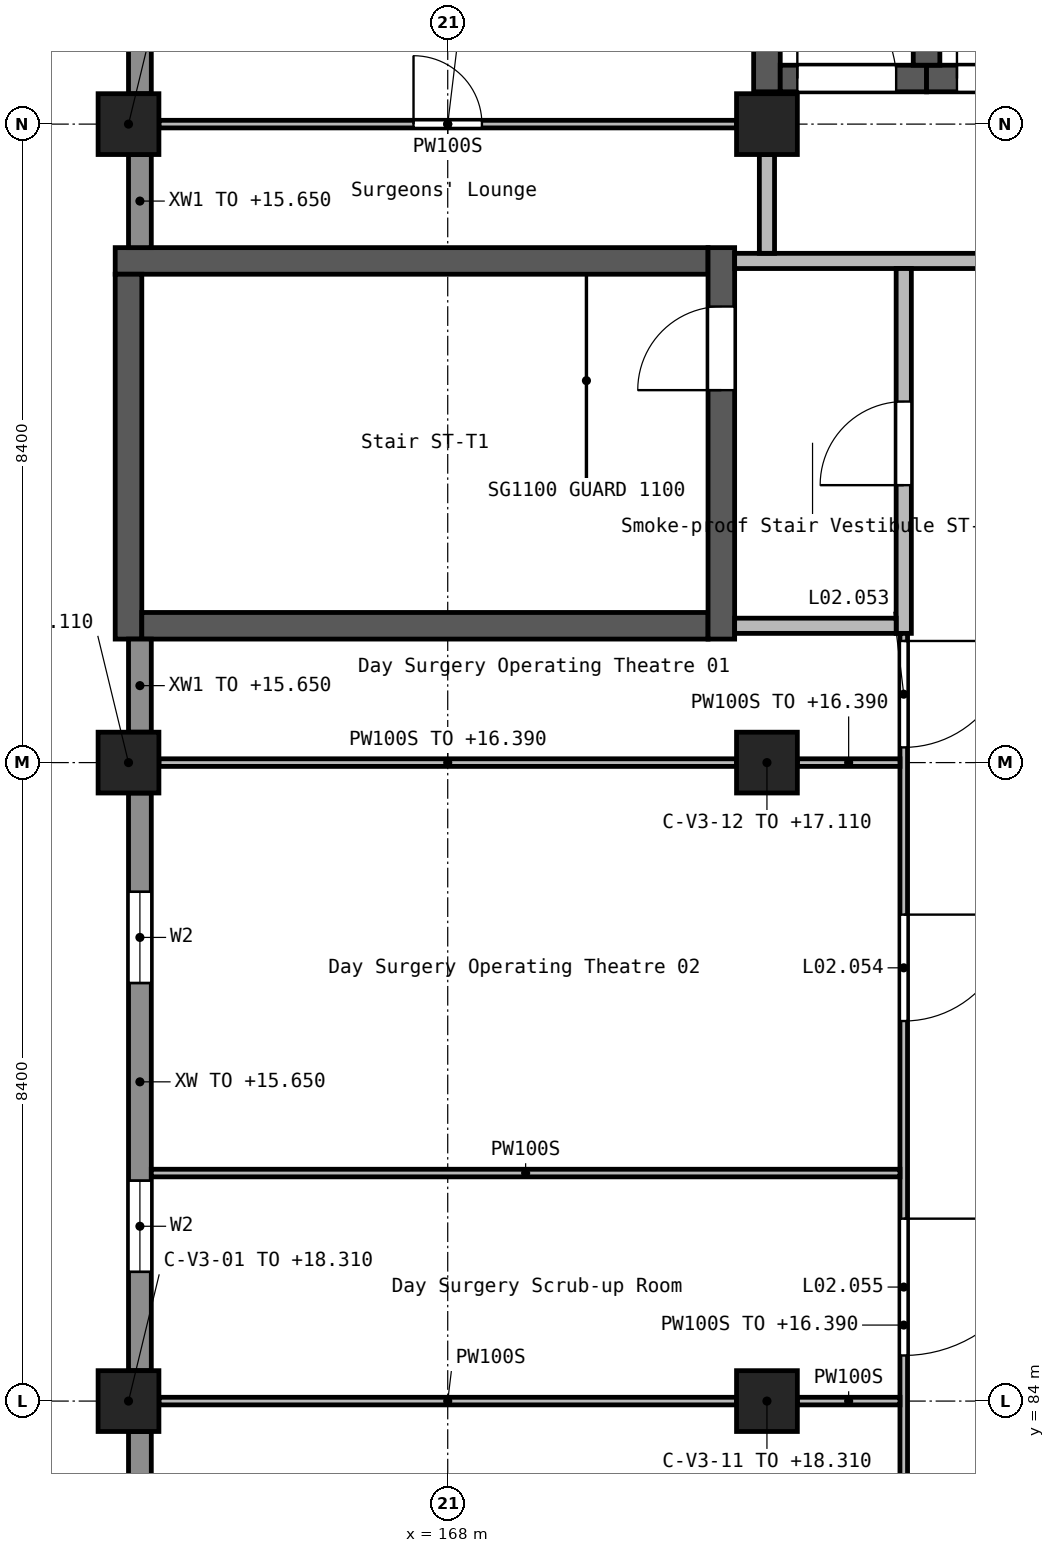
"""IFC4 building model, lengths in metres.
Left out: names, types, materials, properties, quantities, classifications, styles, units other than length and angle.
Written with IfcOpenShell. Run it as: python <this file> out.ifc"""

import sys

from ifc_helpers import new_model, si_unit, direction, frame, frame_2d, origin, origin_2d, place, context, subcontext, project, spatial, rectangle, extrude, element, fill, save


model = new_model("IFC4")
c1 = context("Model", 3, precision=1e-05, world=origin(), true_north=direction((0.0, 1.0)))
c2 = subcontext(c1, "Body", "Model", "MODEL_VIEW")
j1 = project(units=[si_unit("LENGTHUNIT", "METRE"), si_unit("PLANEANGLEUNIT", "RADIAN")], contexts=[c1])
p1 = place(None, origin())
s1 = spatial("IfcSite", under=j1, at=p1, CompositionType="ELEMENT")
p2 = place(p1, origin())
s2 = spatial("IfcBuilding", under=s1, at=p2, CompositionType="ELEMENT")
p3 = place(p2, frame((0.0, 0.0, 12.6)))
s3 = spatial("IfcBuildingStorey", under=s2, at=p3, CompositionType="ELEMENT", Elevation=12.6)
p4 = place(p3, frame((163.8, 84.0, 0.0), z_axis=(0.0, 0.0, 1.0), x_axis=(1.0, 0.0, 0.0)))
e1 = element("IfcColumn", 1, at=p4, inside=s3, PredefinedType="COLUMN", context=c2, shape_type="SweptSolid", body=[
    extrude(rectangle(XDim=0.8, YDim=0.8, at=origin_2d()), origin(), (0.0, 0.0, 1.0), 5.71),
])
p5 = place(p3, frame((163.8, 92.4, 0.0), z_axis=(0.0, 0.0, 1.0), x_axis=(1.0, 0.0, 0.0)))
e2 = element("IfcColumn", 2, at=p5, inside=s3, PredefinedType="COLUMN", context=c2, shape_type="SweptSolid", body=[
    extrude(rectangle(XDim=0.8, YDim=0.8, at=origin_2d()), origin(), (0.0, 0.0, 1.0), 4.51),
])
p6 = place(p3, frame((163.8, 100.8, 0.0), z_axis=(0.0, 0.0, 1.0), x_axis=(1.0, 0.0, 0.0)))
e3 = element("IfcColumn", 3, at=p6, inside=s3, PredefinedType="COLUMN", context=c2, shape_type="SweptSolid", body=[
    extrude(rectangle(XDim=0.8, YDim=0.8, at=origin_2d()), origin(), (0.0, 0.0, 1.0), 6.31),
])
p7 = place(p3, frame((172.2, 84.0, 0.0), z_axis=(0.0, 0.0, 1.0), x_axis=(1.0, 0.0, 0.0)))
e4 = element("IfcColumn", 4, at=p7, inside=s3, PredefinedType="COLUMN", context=c2, shape_type="SweptSolid", body=[
    extrude(rectangle(XDim=0.8, YDim=0.8, at=origin_2d()), origin(), (0.0, 0.0, 1.0), 5.71),
])
p8 = place(p3, frame((172.2, 92.4, 0.0), z_axis=(0.0, 0.0, 1.0), x_axis=(1.0, 0.0, 0.0)))
e5 = element("IfcColumn", 5, at=p8, inside=s3, PredefinedType="COLUMN", context=c2, shape_type="SweptSolid", body=[
    extrude(rectangle(XDim=0.8, YDim=0.8, at=origin_2d()), origin(), (0.0, 0.0, 1.0), 4.51),
])
p9 = place(p3, frame((172.2, 100.8, 0.0), z_axis=(0.0, 0.0, 1.0), x_axis=(1.0, 0.0, 0.0)))
e6 = element("IfcColumn", 6, at=p9, inside=s3, PredefinedType="COLUMN", context=c2, shape_type="SweptSolid", body=[
    extrude(rectangle(XDim=0.8, YDim=0.8, at=origin_2d()), origin(), (0.0, 0.0, 1.0), 6.31),
])
p10 = place(p3, frame((163.625, 99.0, 0.0), z_axis=(0.0, 0.0, 1.0), x_axis=(1.0, 0.0, 0.0)))
e7 = element("IfcWall", 7, at=p10, inside=s3, PredefinedType="SHEAR", context=c2, shape_type="SweptSolid", body=[
    extrude(rectangle(XDim=7.8, YDim=0.35, at=frame_2d((3.9, 0.0))), origin(), (0.0, 0.0, 1.0), 4.2),
])
p11 = place(p3, frame((163.8, 94.025, 0.0), z_axis=(0.0, 0.0, 1.0), x_axis=(0.0, 1.0, 0.0)))
e8 = element("IfcWall", 8, at=p11, inside=s3, PredefinedType="SHEAR", context=c2, shape_type="SweptSolid", body=[
    extrude(rectangle(XDim=4.8, YDim=0.35, at=frame_2d((2.4, 0.0))), origin(), (0.0, 0.0, 1.0), 4.2),
])
p12 = place(p3, frame((163.975, 94.2, 0.0), z_axis=(0.0, 0.0, 1.0), x_axis=(1.0, 0.0, 0.0)))
e9 = element("IfcWall", 9, at=p12, inside=s3, PredefinedType="SHEAR", context=c2, shape_type="SweptSolid", body=[
    extrude(rectangle(XDim=7.45, YDim=0.35, at=frame_2d((3.725, 0.0))), origin(), (0.0, 0.0, 1.0), 4.2),
])
p13 = place(p3, frame((171.6, 94.025, 0.0), z_axis=(0.0, 0.0, 1.0), x_axis=(0.0, 1.0, 0.0)))
e10 = element("IfcWall", 10, at=p13, inside=s3, PredefinedType="SHEAR", context=c2, shape_type="SweptSolid", body=[
    extrude(rectangle(XDim=5.15, YDim=0.35, at=frame_2d((2.575, 0.0))), origin(), (0.0, 0.0, 1.0), 4.2),
])
p14 = place(p13, frame((3.275, 0.0, 0.0)))
e11 = element("IfcOpeningElement", 11, at=p14, cuts=e10, PredefinedType="OPENING", context=c2, shape_type="SweptSolid", body=[
    extrude(rectangle(XDim=1.1, YDim=2.1, at=frame_2d((0.55, 1.05))), frame((0.0, 0.185, 0.0), z_axis=(0.0, -1.0, 0.0), x_axis=(1.0, 0.0, 0.0)), (0.0, 0.0, 1.0), 0.37),
])
p15 = place(p3, frame((172.2, 101.225, 0.0), z_axis=(0.0, 0.0, 1.0), x_axis=(0.0, 1.0, 0.0)))
e12 = element("IfcWall", 12, at=p15, inside=s3, PredefinedType="SHEAR", context=c2, shape_type="SweptSolid", body=[
    extrude(rectangle(XDim=5.4, YDim=0.35, at=frame_2d((2.7, 0.0))), origin(), (0.0, 0.0, 1.0), 4.2),
])
p16 = place(p3, frame((172.375, 101.4, 0.0), z_axis=(0.0, 0.0, 1.0), x_axis=(1.0, 0.0, 0.0)))
e13 = element("IfcWall", 13, at=p16, inside=s3, PredefinedType="SHEAR", context=c2, shape_type="SweptSolid", body=[
    extrude(rectangle(XDim=1.925, YDim=0.35, at=frame_2d((0.962, 0.0))), origin(), (0.0, 0.0, 1.0), 4.2),
])
p17 = place(p16, frame((0.225, 0.0, 0.0)))
e14 = element("IfcOpeningElement", 14, at=p17, cuts=e13, PredefinedType="OPENING", context=c2, shape_type="SweptSolid", body=[
    extrude(rectangle(XDim=1.3, YDim=2.1, at=frame_2d((0.65, 1.05))), frame((0.0, 0.185, 0.0), z_axis=(0.0, -1.0, 0.0), x_axis=(1.0, 0.0, 0.0)), (0.0, 0.0, 1.0), 0.37),
])
p18 = place(p3, frame((174.3, 101.4, 0.0), z_axis=(0.0, 0.0, 1.0), x_axis=(1.0, 0.0, 0.0)))
e15 = element("IfcWall", 15, at=p18, inside=s3, PredefinedType="SHEAR", context=c2, shape_type="SweptSolid", body=[
    extrude(rectangle(XDim=2.1, YDim=0.35, at=frame_2d((1.05, 0.0))), origin(), (0.0, 0.0, 1.0), 4.2),
])
p19 = place(p18, frame((0.4, 0.0, 0.0)))
e16 = element("IfcOpeningElement", 16, at=p19, cuts=e15, PredefinedType="OPENING", context=c2, shape_type="SweptSolid", body=[
    extrude(rectangle(XDim=1.3, YDim=2.1, at=frame_2d((0.65, 1.05))), frame((0.0, 0.185, 0.0), z_axis=(0.0, -1.0, 0.0), x_axis=(1.0, 0.0, 0.0)), (0.0, 0.0, 1.0), 0.37),
])
p20 = place(p3, frame((174.3, 101.575, 0.0), z_axis=(0.0, 0.0, 1.0), x_axis=(0.0, 1.0, 0.0)))
e17 = element("IfcWall", 17, at=p20, inside=s3, PredefinedType="SHEAR", context=c2, shape_type="SweptSolid", body=[
    extrude(rectangle(XDim=5.05, YDim=0.35, at=frame_2d((2.525, 0.0))), origin(), (0.0, 0.0, 1.0), 4.2),
])
p21 = place(p3, frame((163.95, 108.8, 0.0), z_axis=(0.0, 0.0, 1.0), x_axis=(0.0, -1.0, 0.0)))
e18 = element("IfcWall", 18, at=p21, inside=s3, PredefinedType="STANDARD", context=c2, shape_type="SweptSolid", body=[
    extrude(rectangle(XDim=7.6, YDim=0.3, at=frame_2d((3.8, 0.0))), origin(), (0.0, 0.0, 1.0), 3.05),
])
p22 = place(p21, frame((1.3, 0.0, 1.2)))
e19 = element("IfcOpeningElement", 19, at=p22, cuts=e18, PredefinedType="OPENING", context=c2, shape_type="SweptSolid", body=[
    extrude(rectangle(XDim=1.2, YDim=1.2, at=frame_2d((0.6, 0.6))), frame((0.0, 0.16, 0.0), z_axis=(0.0, -1.0, 0.0), x_axis=(1.0, 0.0, 0.0)), (0.0, 0.0, 1.0), 0.32),
])
p23 = place(p21, frame((5.1, 0.0, 1.2)))
e20 = element("IfcOpeningElement", 20, at=p23, cuts=e18, PredefinedType="OPENING", context=c2, shape_type="SweptSolid", body=[
    extrude(rectangle(XDim=1.2, YDim=1.2, at=frame_2d((0.6, 0.6))), frame((0.0, 0.16, 0.0), z_axis=(0.0, -1.0, 0.0), x_axis=(1.0, 0.0, 0.0)), (0.0, 0.0, 1.0), 0.32),
])
for number, where, z_axis, x_axis in (
    (21, (163.95, 100.4, 0.0), (0.0, 0.0, 1.0), (0.0, -1.0, 0.0)),
    (22, (163.95, 94.025, 0.0), (0.0, 0.0, 1.0), (0.0, -1.0, 0.0)),
):
    element("IfcWall", number, at=place(p3, frame(where, z_axis=z_axis, x_axis=x_axis)), inside=s3, PredefinedType="STANDARD", context=c2, shape_type="SweptSolid", body=[
        extrude(rectangle(XDim=1.225, YDim=0.3, at=frame_2d((0.612, 0.0))), origin(), (0.0, 0.0, 1.0), 3.05),
    ])
p24 = place(p3, frame((163.95, 92.0, 0.0), z_axis=(0.0, 0.0, 1.0), x_axis=(0.0, -1.0, 0.0)))
e23 = element("IfcWall", 23, at=p24, inside=s3, PredefinedType="STANDARD", context=c2, shape_type="SweptSolid", body=[
    extrude(rectangle(XDim=7.6, YDim=0.3, at=frame_2d((3.8, 0.0))), origin(), (0.0, 0.0, 1.0), 3.05),
])
p25 = place(p24, frame((1.3, 0.0, 1.2)))
e24 = element("IfcOpeningElement", 24, at=p25, cuts=e23, PredefinedType="OPENING", context=c2, shape_type="SweptSolid", body=[
    extrude(rectangle(XDim=1.2, YDim=1.2, at=frame_2d((0.6, 0.6))), frame((0.0, 0.16, 0.0), z_axis=(0.0, -1.0, 0.0), x_axis=(1.0, 0.0, 0.0)), (0.0, 0.0, 1.0), 0.32),
])
p26 = place(p24, frame((5.1, 0.0, 1.2)))
e25 = element("IfcOpeningElement", 25, at=p26, cuts=e23, PredefinedType="OPENING", context=c2, shape_type="SweptSolid", body=[
    extrude(rectangle(XDim=1.2, YDim=1.2, at=frame_2d((0.6, 0.6))), frame((0.0, 0.16, 0.0), z_axis=(0.0, -1.0, 0.0), x_axis=(1.0, 0.0, 0.0)), (0.0, 0.0, 1.0), 0.32),
])
p27 = place(p3, frame((163.95, 83.6, 0.0), z_axis=(0.0, 0.0, 1.0), x_axis=(0.0, -1.0, 0.0)))
e26 = element("IfcWall", 26, at=p27, inside=s3, PredefinedType="STANDARD", context=c2, shape_type="SweptSolid", body=[
    extrude(rectangle(XDim=7.6, YDim=0.3, at=frame_2d((3.8, 0.0))), origin(), (0.0, 0.0, 1.0), 3.05),
])
p28 = place(p27, frame((1.3, 0.0, 1.2)))
e27 = element("IfcOpeningElement", 27, at=p28, cuts=e26, PredefinedType="OPENING", context=c2, shape_type="SweptSolid", body=[
    extrude(rectangle(XDim=1.2, YDim=1.2, at=frame_2d((0.6, 0.6))), frame((0.0, 0.16, 0.0), z_axis=(0.0, -1.0, 0.0), x_axis=(1.0, 0.0, 0.0)), (0.0, 0.0, 1.0), 0.32),
])
p29 = place(p27, frame((5.1, 0.0, 1.2)))
e28 = element("IfcOpeningElement", 28, at=p29, cuts=e26, PredefinedType="OPENING", context=c2, shape_type="SweptSolid", body=[
    extrude(rectangle(XDim=1.2, YDim=1.2, at=frame_2d((0.6, 0.6))), frame((0.0, 0.16, 0.0), z_axis=(0.0, -1.0, 0.0), x_axis=(1.0, 0.0, 0.0)), (0.0, 0.0, 1.0), 0.32),
])
p30 = place(p3, frame((180.7, 99.0, 0.0), z_axis=(0.0, 0.0, 1.0), x_axis=(-1.0, 0.0, 0.0)))
e29 = element("IfcWall", 29, at=p30, inside=s3, PredefinedType="SOLIDWALL", context=c2, shape_type="SweptSolid", body=[
    extrude(rectangle(XDim=8.925, YDim=0.2, at=frame_2d((4.462, 0.0))), origin(), (0.0, 0.0, 1.0), 3.85),
])
p31 = place(p30, frame((2.5, 0.0, 0.0)))
e30 = element("IfcOpeningElement", 30, at=p31, cuts=e29, PredefinedType="OPENING", context=c2, shape_type="SweptSolid", body=[
    extrude(rectangle(XDim=1.8, YDim=2.1, at=frame_2d((0.9, 1.05))), frame((0.0, 0.11, 0.0), z_axis=(0.0, -1.0, 0.0), x_axis=(1.0, 0.0, 0.0)), (0.0, 0.0, 1.0), 0.22),
])
p32 = place(p3, frame((174.0, 94.1, 0.0), z_axis=(0.0, 0.0, 1.0), x_axis=(0.0, 1.0, 0.0)))
e31 = element("IfcWall", 31, at=p32, inside=s3, PredefinedType="SOLIDWALL", context=c2, shape_type="SweptSolid", body=[
    extrude(rectangle(XDim=4.8, YDim=0.2, at=frame_2d((2.4, 0.0))), origin(), (0.0, 0.0, 1.0), 3.85),
])
p33 = place(p32, frame((1.95, 0.0, 0.0)))
e32 = element("IfcOpeningElement", 32, at=p33, cuts=e31, PredefinedType="OPENING", context=c2, shape_type="SweptSolid", body=[
    extrude(rectangle(XDim=1.1, YDim=2.1, at=frame_2d((0.55, 1.05))), frame((0.0, 0.11, 0.0), z_axis=(0.0, -1.0, 0.0), x_axis=(1.0, 0.0, 0.0)), (0.0, 0.0, 1.0), 0.22),
])
p34 = place(p3, frame((171.775, 94.2, 0.0), z_axis=(0.0, 0.0, 1.0), x_axis=(1.0, 0.0, 0.0)))
e33 = element("IfcWall", 33, at=p34, inside=s3, PredefinedType="SOLIDWALL", context=c2, shape_type="SweptSolid", body=[
    extrude(rectangle(XDim=2.125, YDim=0.2, at=frame_2d((1.062, 0.0))), origin(), (0.0, 0.0, 1.0), 3.85),
])
p35 = place(p3, frame((172.2, 99.1, 0.0), z_axis=(0.0, 0.0, 1.0), x_axis=(0.0, 1.0, 0.0)))
e34 = element("IfcWall", 34, at=p35, inside=s3, PredefinedType="SOLIDWALL", context=c2, shape_type="SweptSolid", body=[
    extrude(rectangle(XDim=1.3, YDim=0.2, at=frame_2d((0.65, 0.0))), origin(), (0.0, 0.0, 1.0), 3.85),
])
p36 = place(p3, frame((174.0, 94.1, 0.0), z_axis=(0.0, 0.0, 1.0), x_axis=(0.0, -1.0, 0.0)))
e35 = element("IfcWall", 35, at=p36, inside=s3, PredefinedType="PARTITIONING", context=c2, shape_type="SweptSolid", body=[
    extrude(rectangle(XDim=18.2, YDim=0.1, at=frame_2d((9.1, 0.0))), origin(), (0.0, 0.0, 1.0), 3.79),
])
p37 = place(p36, frame((0.1, 0.0, 0.0)))
e36 = element("IfcOpeningElement", 36, at=p37, cuts=e35, PredefinedType="OPENING", context=c2, shape_type="SweptSolid", body=[
    extrude(rectangle(XDim=1.4, YDim=2.1, at=frame_2d((0.7, 1.05))), frame((0.0, 0.06, 0.0), z_axis=(0.0, -1.0, 0.0), x_axis=(1.0, 0.0, 0.0)), (0.0, 0.0, 1.0), 0.12),
])
p38 = place(p36, frame((3.7, 0.0, 0.0)))
e37 = element("IfcOpeningElement", 37, at=p38, cuts=e35, PredefinedType="OPENING", context=c2, shape_type="SweptSolid", body=[
    extrude(rectangle(XDim=1.4, YDim=2.1, at=frame_2d((0.7, 1.05))), frame((0.0, 0.06, 0.0), z_axis=(0.0, -1.0, 0.0), x_axis=(1.0, 0.0, 0.0)), (0.0, 0.0, 1.0), 0.12),
])
p39 = place(p36, frame((7.7, 0.0, 0.0)))
e38 = element("IfcOpeningElement", 38, at=p39, cuts=e35, PredefinedType="OPENING", context=c2, shape_type="SweptSolid", body=[
    extrude(rectangle(XDim=1.8, YDim=2.1, at=frame_2d((0.9, 1.05))), frame((0.0, 0.06, 0.0), z_axis=(0.0, -1.0, 0.0), x_axis=(1.0, 0.0, 0.0)), (0.0, 0.0, 1.0), 0.12),
])
p40 = place(p36, frame((11.8, 0.0, 0.0)))
e39 = element("IfcOpeningElement", 39, at=p40, cuts=e35, PredefinedType="OPENING", context=c2, shape_type="SweptSolid", body=[
    extrude(rectangle(XDim=1.4, YDim=2.1, at=frame_2d((0.7, 1.05))), frame((0.0, 0.06, 0.0), z_axis=(0.0, -1.0, 0.0), x_axis=(1.0, 0.0, 0.0)), (0.0, 0.0, 1.0), 0.12),
])
p41 = place(p36, frame((16.0, 0.0, 0.0)))
e40 = element("IfcOpeningElement", 40, at=p41, cuts=e35, PredefinedType="OPENING", context=c2, shape_type="SweptSolid", body=[
    extrude(rectangle(XDim=1.4, YDim=2.1, at=frame_2d((0.7, 1.05))), frame((0.0, 0.06, 0.0), z_axis=(0.0, -1.0, 0.0), x_axis=(1.0, 0.0, 0.0)), (0.0, 0.0, 1.0), 0.12),
])
p42 = place(p3, frame((164.2, 84.0, 0.0), z_axis=(0.0, 0.0, 1.0), x_axis=(1.0, 0.0, 0.0)))
e41 = element("IfcWall", 41, at=p42, inside=s3, PredefinedType="PARTITIONING", context=c2, shape_type="SweptSolid", body=[
    extrude(rectangle(XDim=7.6, YDim=0.1, at=frame_2d((3.8, 0.0))), origin(), (0.0, 0.0, 1.0), 3.85),
])
p43 = place(p3, frame((172.6, 84.0, 0.0), z_axis=(0.0, 0.0, 1.0), x_axis=(1.0, 0.0, 0.0)))
e42 = element("IfcWall", 42, at=p43, inside=s3, PredefinedType="PARTITIONING", context=c2, shape_type="SweptSolid", body=[
    extrude(rectangle(XDim=1.35, YDim=0.1, at=frame_2d((0.675, 0.0))), origin(), (0.0, 0.0, 1.0), 3.85),
])
p44 = place(p3, frame((164.1, 87.0, 0.0), z_axis=(0.0, 0.0, 1.0), x_axis=(1.0, 0.0, 0.0)))
e43 = element("IfcWall", 43, at=p44, inside=s3, PredefinedType="PARTITIONING", context=c2, shape_type="SweptSolid", body=[
    extrude(rectangle(XDim=9.85, YDim=0.1, at=frame_2d((4.925, 0.0))), origin(), (0.0, 0.0, 1.0), 3.85),
])
p45 = place(p3, frame((164.2, 92.4, 0.0), z_axis=(0.0, 0.0, 1.0), x_axis=(1.0, 0.0, 0.0)))
e44 = element("IfcWall", 44, at=p45, inside=s3, PredefinedType="PARTITIONING", context=c2, shape_type="SweptSolid", body=[
    extrude(rectangle(XDim=7.6, YDim=0.1, at=frame_2d((3.8, 0.0))), origin(), (0.0, 0.0, 1.0), 3.79),
])
p46 = place(p3, frame((172.6, 92.4, 0.0), z_axis=(0.0, 0.0, 1.0), x_axis=(1.0, 0.0, 0.0)))
e45 = element("IfcWall", 45, at=p46, inside=s3, PredefinedType="PARTITIONING", context=c2, shape_type="SweptSolid", body=[
    extrude(rectangle(XDim=1.35, YDim=0.1, at=frame_2d((0.675, 0.0))), origin(), (0.0, 0.0, 1.0), 3.79),
])
p47 = place(p3, frame((164.2, 100.8, 0.0), z_axis=(0.0, 0.0, 1.0), x_axis=(1.0, 0.0, 0.0)))
e46 = element("IfcWall", 46, at=p47, inside=s3, PredefinedType="PARTITIONING", context=c2, shape_type="SweptSolid", body=[
    extrude(rectangle(XDim=7.6, YDim=0.1, at=frame_2d((3.8, 0.0))), origin(), (0.0, 0.0, 1.0), 3.85),
])
p48 = place(p47, frame((3.35, 0.0, 0.0)))
e47 = element("IfcOpeningElement", 47, at=p48, cuts=e46, PredefinedType="OPENING", context=c2, shape_type="SweptSolid", body=[
    extrude(rectangle(XDim=0.9, YDim=2.1, at=frame_2d((0.45, 1.05))), frame((0.0, 0.06, 0.0), z_axis=(0.0, -1.0, 0.0), x_axis=(1.0, 0.0, 0.0)), (0.0, 0.0, 1.0), 0.12),
])
p49 = place(p25, origin())
e48 = element("IfcWindow", 48, at=p49, inside=s3, PartitioningType="SINGLE_PANEL", PredefinedType="WINDOW", context=c2, shape_type="SweptSolid", body=[
    extrude(rectangle(XDim=1.2, YDim=1.2, at=frame_2d((0.6, 0.6))), frame((0.0, 0.03, 0.0), z_axis=(0.0, -1.0, 0.0), x_axis=(1.0, 0.0, 0.0)), (0.0, 0.0, 1.0), 0.06),
])
fill(e24, e48)
p50 = place(p26, origin())
e49 = element("IfcWindow", 49, at=p50, inside=s3, PartitioningType="SINGLE_PANEL", PredefinedType="WINDOW", context=c2, shape_type="SweptSolid", body=[
    extrude(rectangle(XDim=1.2, YDim=1.2, at=frame_2d((0.6, 0.6))), frame((0.0, 0.03, 0.0), z_axis=(0.0, -1.0, 0.0), x_axis=(1.0, 0.0, 0.0)), (0.0, 0.0, 1.0), 0.06),
])
fill(e25, e49)
p51 = place(p17, origin())
e50 = element("IfcDoor", 50, at=p51, inside=s3, OperationType="DOUBLE_DOOR_SLIDING", PredefinedType="DOOR", context=c2, shape_type="SweptSolid", body=[
    extrude(rectangle(XDim=1.3, YDim=2.1, at=frame_2d((0.65, 1.05))), frame((0.0, 0.025, 0.0), z_axis=(0.0, -1.0, 0.0), x_axis=(1.0, 0.0, 0.0)), (0.0, 0.0, 1.0), 0.05),
])
fill(e14, e50)
p52 = place(p19, origin())
e51 = element("IfcDoor", 51, at=p52, inside=s3, OperationType="DOUBLE_DOOR_SLIDING", PredefinedType="DOOR", context=c2, shape_type="SweptSolid", body=[
    extrude(rectangle(XDim=1.3, YDim=2.1, at=frame_2d((0.65, 1.05))), frame((0.0, 0.025, 0.0), z_axis=(0.0, -1.0, 0.0), x_axis=(1.0, 0.0, 0.0)), (0.0, 0.0, 1.0), 0.05),
])
fill(e16, e51)
p53 = place(p14, origin())
e52 = element("IfcDoor", 52, at=p53, inside=s3, OperationType="SINGLE_SWING_RIGHT", PredefinedType="DOOR", context=c2, shape_type="SweptSolid", body=[
    extrude(rectangle(XDim=1.1, YDim=2.1, at=frame_2d((0.55, 1.05))), frame((0.0, 0.025, 0.0), z_axis=(0.0, -1.0, 0.0), x_axis=(1.0, 0.0, 0.0)), (0.0, 0.0, 1.0), 0.05),
])
fill(e11, e52)
p54 = place(p33, origin())
e53 = element("IfcDoor", 53, at=p54, inside=s3, OperationType="SINGLE_SWING_RIGHT", PredefinedType="DOOR", context=c2, shape_type="SweptSolid", body=[
    extrude(rectangle(XDim=1.1, YDim=2.1, at=frame_2d((0.55, 1.05))), frame((0.0, 0.025, 0.0), z_axis=(0.0, -1.0, 0.0), x_axis=(1.0, 0.0, 0.0)), (0.0, 0.0, 1.0), 0.05),
])
fill(e32, e53)
p55 = place(p37, frame((1.4, 0.0, 0.0), z_axis=(0.0, 0.0, 1.0), x_axis=(-1.0, 0.0, 0.0)))
e54 = element("IfcDoor", 54, at=p55, inside=s3, OperationType="DOUBLE_DOOR_SINGLE_SWING", PredefinedType="DOOR", context=c2, shape_type="SweptSolid", body=[
    extrude(rectangle(XDim=1.4, YDim=2.1, at=frame_2d((0.7, 1.05))), frame((0.0, 0.025, 0.0), z_axis=(0.0, -1.0, 0.0), x_axis=(1.0, 0.0, 0.0)), (0.0, 0.0, 1.0), 0.05),
])
fill(e36, e54)
p56 = place(p38, frame((1.4, 0.0, 0.0), z_axis=(0.0, 0.0, 1.0), x_axis=(-1.0, 0.0, 0.0)))
e55 = element("IfcDoor", 55, at=p56, inside=s3, OperationType="DOUBLE_DOOR_SINGLE_SWING", PredefinedType="DOOR", context=c2, shape_type="SweptSolid", body=[
    extrude(rectangle(XDim=1.4, YDim=2.1, at=frame_2d((0.7, 1.05))), frame((0.0, 0.025, 0.0), z_axis=(0.0, -1.0, 0.0), x_axis=(1.0, 0.0, 0.0)), (0.0, 0.0, 1.0), 0.05),
])
fill(e37, e55)
p57 = place(p39, frame((1.8, 0.0, 0.0), z_axis=(0.0, 0.0, 1.0), x_axis=(-1.0, 0.0, 0.0)))
e56 = element("IfcDoor", 56, at=p57, inside=s3, OperationType="DOUBLE_DOOR_SINGLE_SWING", PredefinedType="DOOR", context=c2, shape_type="SweptSolid", body=[
    extrude(rectangle(XDim=1.8, YDim=2.1, at=frame_2d((0.9, 1.05))), frame((0.0, 0.025, 0.0), z_axis=(0.0, -1.0, 0.0), x_axis=(1.0, 0.0, 0.0)), (0.0, 0.0, 1.0), 0.05),
])
fill(e38, e56)
p58 = place(p48, frame((0.9, 0.0, 0.0), z_axis=(0.0, 0.0, 1.0), x_axis=(-1.0, 0.0, 0.0)))
e57 = element("IfcDoor", 57, at=p58, inside=s3, OperationType="SINGLE_SWING_RIGHT", PredefinedType="DOOR", context=c2, shape_type="SweptSolid", body=[
    extrude(rectangle(XDim=0.9, YDim=2.1, at=frame_2d((0.45, 1.05))), frame((0.0, 0.025, 0.0), z_axis=(0.0, -1.0, 0.0), x_axis=(1.0, 0.0, 0.0)), (0.0, 0.0, 1.0), 0.05),
])
fill(e47, e57)
save(model, sys.argv[1])
